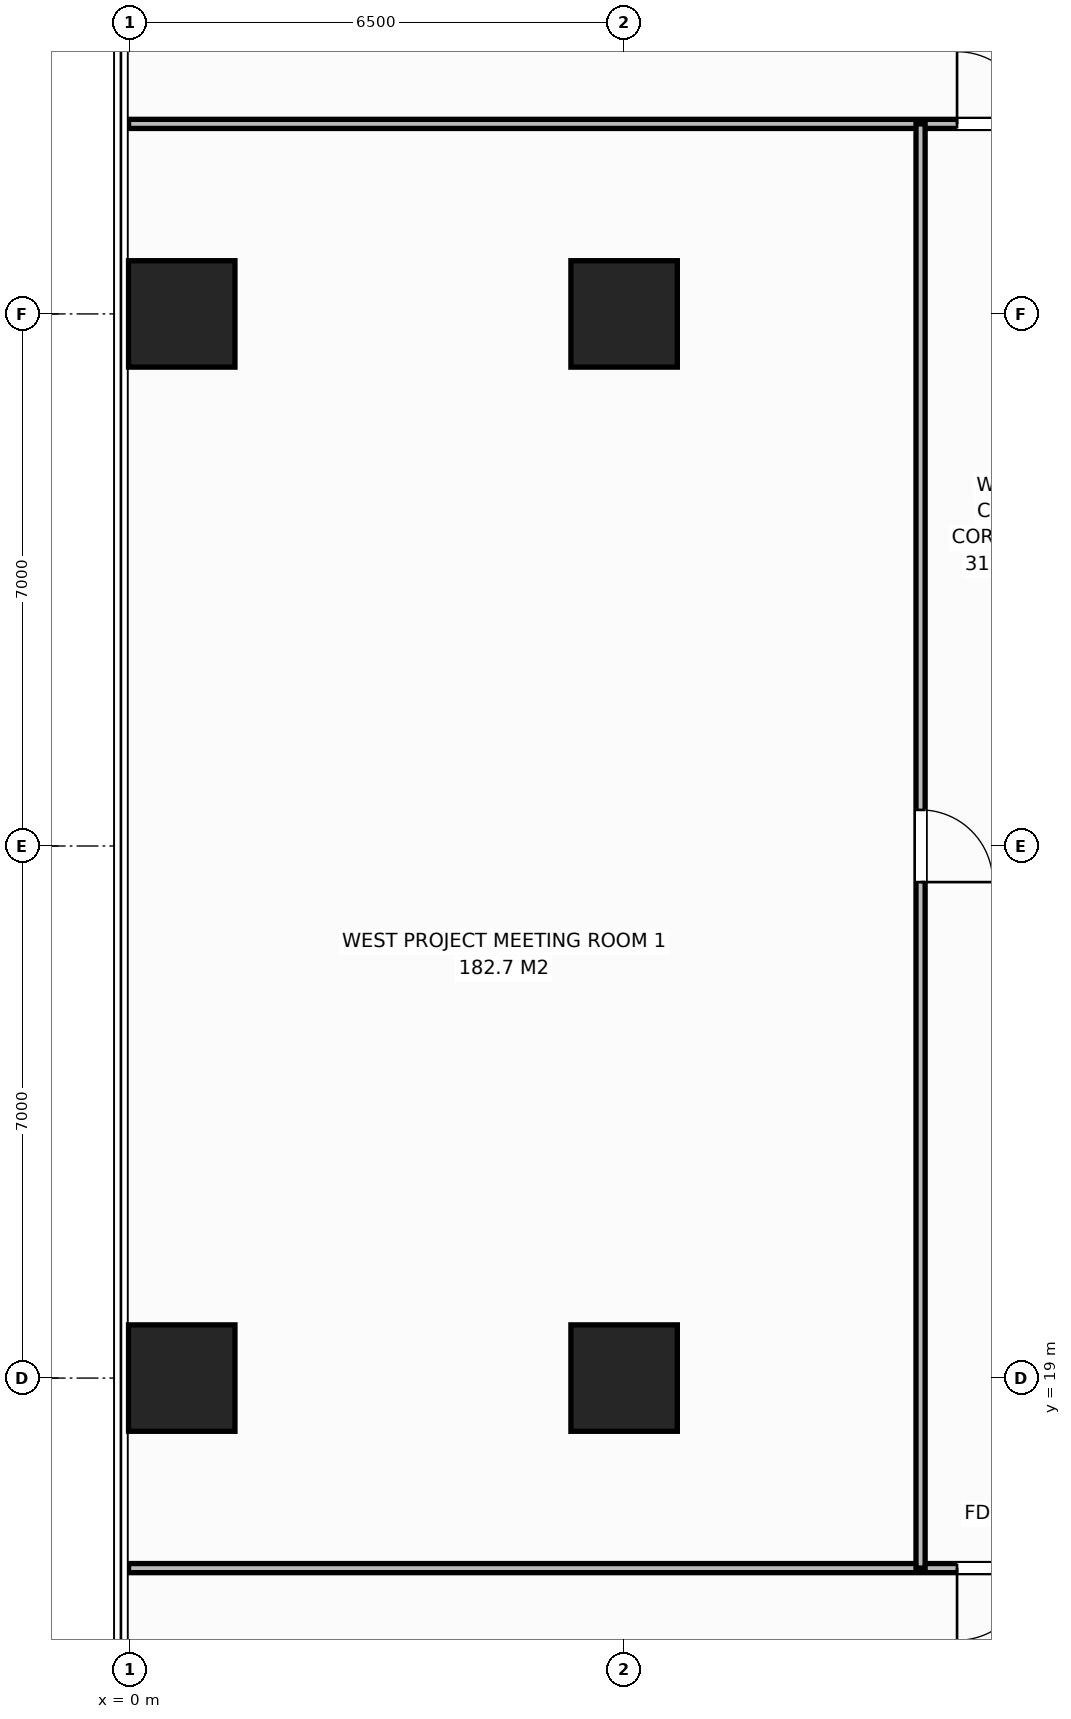
"""IFC4 building model, lengths in metres.
Left out: names, types, materials, properties, quantities, classifications, styles, units other than length and angle.
Written with IfcOpenShell. Run it as: python <this file> out.ifc"""

import sys

from ifc_helpers import new_model, si_unit, direction, frame, frame_2d, origin, origin_2d, place, context, subcontext, project, spatial, rectangle, extrude, element, fill, save


model = new_model("IFC4")
c1 = context("Model", 3, precision=1e-05, world=origin(), true_north=direction((0.0, 1.0)))
c2 = subcontext(c1, "Body", "Model", "MODEL_VIEW")
j1 = project(units=[si_unit("LENGTHUNIT", "METRE"), si_unit("PLANEANGLEUNIT", "RADIAN")], contexts=[c1])
p1 = place(None, origin())
s1 = spatial("IfcSite", under=j1, at=p1, CompositionType="ELEMENT")
p2 = place(p1, origin())
s2 = spatial("IfcBuilding", under=s1, at=p2, CompositionType="ELEMENT")
p3 = place(p2, frame((0.0, 0.0, 35.4)))
s3 = spatial("IfcBuildingStorey", under=s2, at=p3, CompositionType="ELEMENT", Elevation=35.4)
for number, where, z_axis, x_axis in (
    (1, (6.5, 19.0, 0.0), (0.0, 0.0, 1.0), (1.0, 0.0, 0.0)),
    (2, (6.5, 33.0, 0.0), (0.0, 0.0, 1.0), (1.0, 0.0, 0.0)),
    (3, (0.68, 19.0, 0.0), (0.0, 0.0, 1.0), (1.0, 0.0, 0.0)),
    (4, (0.68, 33.0, 0.0), (0.0, 0.0, 1.0), (1.0, 0.0, 0.0)),
):
    element("IfcColumn", number, at=place(p3, frame(where, z_axis=z_axis, x_axis=x_axis)), inside=s3, PredefinedType="COLUMN", context=c2, shape_type="SweptSolid", body=[
        extrude(rectangle(XDim=1.4, YDim=1.4, at=origin_2d()), origin(), (0.0, 0.0, 1.0), 3.8),
    ])
p4 = place(p3, frame((-0.02, 35.5, 0.0), z_axis=(0.0, 0.0, 1.0), x_axis=(1.0, 0.0, 0.0)))
e5 = element("IfcWall", 5, at=p4, inside=s3, PredefinedType="PARTITIONING", context=c2, shape_type="SweptSolid", body=[
    extrude(rectangle(XDim=13.16, YDim=0.12, at=frame_2d((6.58, 0.0))), origin(), (0.0, 0.0, 1.0), 3.55),
])
p5 = place(p4, frame((10.9, 0.0, 0.0)))
e6 = element("IfcOpeningElement", 6, at=p5, cuts=e5, PredefinedType="OPENING", context=c2, shape_type="SweptSolid", body=[
    extrude(rectangle(XDim=0.95, YDim=2.15, at=frame_2d((0.475, 1.075))), frame((0.0, 0.07, 0.0), z_axis=(0.0, -1.0, 0.0), x_axis=(1.0, 0.0, 0.0)), (0.0, 0.0, 1.0), 0.14),
])
p6 = place(p3, frame((-0.02, 16.5, 0.0), z_axis=(0.0, 0.0, 1.0), x_axis=(1.0, 0.0, 0.0)))
e7 = element("IfcWall", 7, at=p6, inside=s3, PredefinedType="PARTITIONING", context=c2, shape_type="SweptSolid", body=[
    extrude(rectangle(XDim=39.943, YDim=0.12, at=frame_2d((19.972, 0.0))), origin(), (0.0, 0.0, 1.0), 3.55),
])
p7 = place(p6, frame((10.9, 0.0, 0.0)))
e8 = element("IfcOpeningElement", 8, at=p7, cuts=e7, PredefinedType="OPENING", context=c2, shape_type="SweptSolid", body=[
    extrude(rectangle(XDim=0.95, YDim=2.15, at=frame_2d((0.475, 1.075))), frame((0.0, 0.07, 0.0), z_axis=(0.0, -1.0, 0.0), x_axis=(1.0, 0.0, 0.0)), (0.0, 0.0, 1.0), 0.14),
])
p8 = place(p3, frame((10.4, 16.5, 0.0), z_axis=(0.0, 0.0, 1.0), x_axis=(0.0, 1.0, 0.0)))
e9 = element("IfcWall", 9, at=p8, inside=s3, PredefinedType="PARTITIONING", context=c2, shape_type="SweptSolid", body=[
    extrude(rectangle(XDim=19.0, YDim=0.12, at=frame_2d((9.5, 0.0))), origin(), (0.0, 0.0, 1.0), 3.55),
])
p9 = place(p8, frame((9.025, 0.0, 0.0)))
e10 = element("IfcOpeningElement", 10, at=p9, cuts=e9, PredefinedType="OPENING", context=c2, shape_type="SweptSolid", body=[
    extrude(rectangle(XDim=0.95, YDim=2.15, at=frame_2d((0.475, 1.075))), frame((0.0, 0.07, 0.0), z_axis=(0.0, -1.0, 0.0), x_axis=(1.0, 0.0, 0.0)), (0.0, 0.0, 1.0), 0.14),
])
p10 = place(p5, origin())
e11 = element("IfcDoor", 11, at=p10, inside=s3, OperationType="SINGLE_SWING_LEFT", PredefinedType="DOOR", context=c2, shape_type="SweptSolid", body=[
    extrude(rectangle(XDim=0.95, YDim=2.15, at=frame_2d((0.475, 1.075))), frame((0.0, 0.025, 0.0), z_axis=(0.0, -1.0, 0.0), x_axis=(1.0, 0.0, 0.0)), (0.0, 0.0, 1.0), 0.05),
])
fill(e6, e11)
p11 = place(p7, origin())
e12 = element("IfcDoor", 12, at=p11, inside=s3, OperationType="SINGLE_SWING_RIGHT", PredefinedType="DOOR", context=c2, shape_type="SweptSolid", body=[
    extrude(rectangle(XDim=0.95, YDim=2.15, at=frame_2d((0.475, 1.075))), frame((0.0, 0.025, 0.0), z_axis=(0.0, -1.0, 0.0), x_axis=(1.0, 0.0, 0.0)), (0.0, 0.0, 1.0), 0.05),
])
fill(e8, e12)
p12 = place(p9, origin())
e13 = element("IfcDoor", 13, at=p12, inside=s3, OperationType="SINGLE_SWING_RIGHT", PredefinedType="DOOR", context=c2, shape_type="SweptSolid", body=[
    extrude(rectangle(XDim=0.95, YDim=2.15, at=frame_2d((0.475, 1.075))), frame((0.0, 0.025, 0.0), z_axis=(0.0, -1.0, 0.0), x_axis=(1.0, 0.0, 0.0)), (0.0, 0.0, 1.0), 0.05),
])
fill(e10, e13)
save(model, sys.argv[1])
